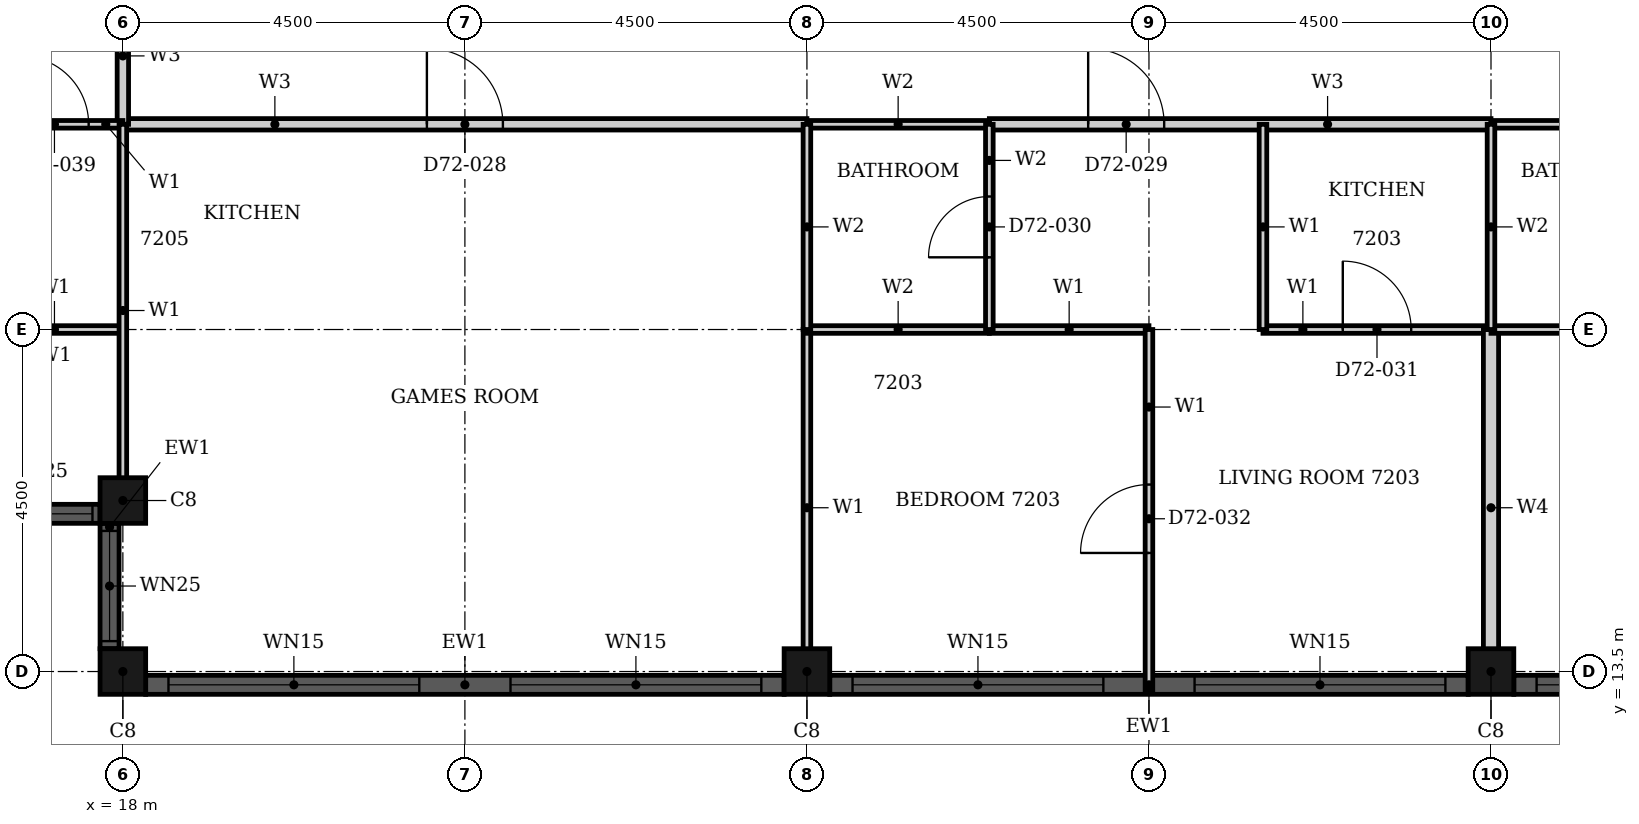
"""IFC4 building model, lengths in metres.
Left out: names, types, materials, properties, quantities, classifications, styles, units other than length and angle.
Written with IfcOpenShell. Run it as: python <this file> out.ifc"""

import sys

from ifc_helpers import new_model, si_unit, direction, frame, frame_2d, origin, origin_2d, place, context, subcontext, project, spatial, rectangle, hollow_rectangle, extrude, element, fill, save


model = new_model("IFC4")
c1 = context("Model", 3, precision=1e-05, world=origin(), true_north=direction((0.0, 1.0)))
c2 = subcontext(c1, "Body", "Model", "MODEL_VIEW")
j1 = project(units=[si_unit("LENGTHUNIT", "METRE"), si_unit("PLANEANGLEUNIT", "RADIAN")], contexts=[c1])
p1 = place(None, origin())
s1 = spatial("IfcSite", under=j1, at=p1, CompositionType="ELEMENT")
p2 = place(p1, origin())
s2 = spatial("IfcBuilding", under=s1, at=p2, CompositionType="ELEMENT")
p3 = place(p2, frame((0.0, 0.0, 283.4)))
s3 = spatial("IfcBuildingStorey", under=s2, at=p3, CompositionType="ELEMENT", Elevation=283.4)
for number, where, z_axis, x_axis in (
    (1, (18.0, 15.75, 0.0), (0.0, 0.0, 1.0), (1.0, 0.0, 0.0)),
    (2, (18.0, 13.5, 0.0), (0.0, 0.0, 1.0), (1.0, 0.0, 0.0)),
    (3, (27.0, 13.5, 0.0), (0.0, 0.0, 1.0), (1.0, 0.0, 0.0)),
    (4, (36.0, 13.5, 0.0), (0.0, 0.0, 1.0), (1.0, 0.0, 0.0)),
):
    element("IfcColumn", number, at=place(p3, frame(where, z_axis=z_axis, x_axis=x_axis)), inside=s3, PredefinedType="COLUMN", context=c2, shape_type="SweptSolid", body=[
        extrude(hollow_rectangle(XDim=0.6, YDim=0.6, WallThickness=0.02, at=origin_2d()), origin(), (0.0, 0.0, 1.0), 3.7),
    ])
p4 = place(p3, frame((16.05, 15.575, 0.0), z_axis=(0.0, 0.0, 1.0), x_axis=(1.0, 0.0, 0.0)))
e5 = element("IfcWall", 5, at=p4, inside=s3, PredefinedType="SOLIDWALL", context=c2, shape_type="SweptSolid", body=[
    extrude(rectangle(XDim=1.65, YDim=0.25, at=frame_2d((0.825, 0.0))), origin(), (0.0, 0.0, 1.0), 3.7),
])
p5 = place(p4, frame((0.1, 0.0, 0.9)))
e6 = element("IfcOpeningElement", 6, at=p5, cuts=e5, PredefinedType="OPENING", context=c2, shape_type="SweptSolid", body=[
    extrude(rectangle(XDim=1.45, YDim=1.85, at=frame_2d((0.725, 0.925))), frame((0.0, 0.135, 0.0), z_axis=(0.0, -1.0, 0.0), x_axis=(1.0, 0.0, 0.0)), (0.0, 0.0, 1.0), 0.27),
])
p6 = place(p3, frame((17.825, 15.45, 0.0), z_axis=(0.0, 0.0, 1.0), x_axis=(0.0, -1.0, 0.0)))
e7 = element("IfcWall", 7, at=p6, inside=s3, PredefinedType="SOLIDWALL", context=c2, shape_type="SweptSolid", body=[
    extrude(rectangle(XDim=1.65, YDim=0.25, at=frame_2d((0.825, 0.0))), origin(), (0.0, 0.0, 1.0), 3.7),
])
p7 = place(p6, frame((0.1, 0.0, 0.9)))
e8 = element("IfcOpeningElement", 8, at=p7, cuts=e7, PredefinedType="OPENING", context=c2, shape_type="SweptSolid", body=[
    extrude(rectangle(XDim=1.45, YDim=1.85, at=frame_2d((0.725, 0.925))), frame((0.0, 0.135, 0.0), z_axis=(0.0, -1.0, 0.0), x_axis=(1.0, 0.0, 0.0)), (0.0, 0.0, 1.0), 0.27),
])
p8 = place(p3, frame((18.3, 13.325, 0.0), z_axis=(0.0, 0.0, 1.0), x_axis=(1.0, 0.0, 0.0)))
e9 = element("IfcWall", 9, at=p8, inside=s3, PredefinedType="SOLIDWALL", context=c2, shape_type="SweptSolid", body=[
    extrude(rectangle(XDim=8.4, YDim=0.25, at=frame_2d((4.2, 0.0))), origin(), (0.0, 0.0, 1.0), 3.7),
])
p9 = place(p8, frame((0.3, 0.0, 0.45)))
e10 = element("IfcOpeningElement", 10, at=p9, cuts=e9, PredefinedType="OPENING", context=c2, shape_type="SweptSolid", body=[
    extrude(rectangle(XDim=3.3, YDim=2.3, at=frame_2d((1.65, 1.15))), frame((0.0, 0.135, 0.0), z_axis=(0.0, -1.0, 0.0), x_axis=(1.0, 0.0, 0.0)), (0.0, 0.0, 1.0), 0.27),
])
p10 = place(p8, frame((4.8, 0.0, 0.45)))
e11 = element("IfcOpeningElement", 11, at=p10, cuts=e9, PredefinedType="OPENING", context=c2, shape_type="SweptSolid", body=[
    extrude(rectangle(XDim=3.3, YDim=2.3, at=frame_2d((1.65, 1.15))), frame((0.0, 0.135, 0.0), z_axis=(0.0, -1.0, 0.0), x_axis=(1.0, 0.0, 0.0)), (0.0, 0.0, 1.0), 0.27),
])
p11 = place(p3, frame((27.3, 13.325, 0.0), z_axis=(0.0, 0.0, 1.0), x_axis=(1.0, 0.0, 0.0)))
e12 = element("IfcWall", 12, at=p11, inside=s3, PredefinedType="SOLIDWALL", context=c2, shape_type="SweptSolid", body=[
    extrude(rectangle(XDim=8.4, YDim=0.25, at=frame_2d((4.2, 0.0))), origin(), (0.0, 0.0, 1.0), 3.7),
])
p12 = place(p11, frame((0.3, 0.0, 0.45)))
e13 = element("IfcOpeningElement", 13, at=p12, cuts=e12, PredefinedType="OPENING", context=c2, shape_type="SweptSolid", body=[
    extrude(rectangle(XDim=3.3, YDim=2.3, at=frame_2d((1.65, 1.15))), frame((0.0, 0.135, 0.0), z_axis=(0.0, -1.0, 0.0), x_axis=(1.0, 0.0, 0.0)), (0.0, 0.0, 1.0), 0.27),
])
p13 = place(p11, frame((4.8, 0.0, 0.45)))
e14 = element("IfcOpeningElement", 14, at=p13, cuts=e12, PredefinedType="OPENING", context=c2, shape_type="SweptSolid", body=[
    extrude(rectangle(XDim=3.3, YDim=2.3, at=frame_2d((1.65, 1.15))), frame((0.0, 0.135, 0.0), z_axis=(0.0, -1.0, 0.0), x_axis=(1.0, 0.0, 0.0)), (0.0, 0.0, 1.0), 0.27),
])
p14 = place(p3, frame((36.3, 13.325, 0.0), z_axis=(0.0, 0.0, 1.0), x_axis=(1.0, 0.0, 0.0)))
e15 = element("IfcWall", 15, at=p14, inside=s3, PredefinedType="SOLIDWALL", context=c2, shape_type="SweptSolid", body=[
    extrude(rectangle(XDim=8.4, YDim=0.25, at=frame_2d((4.2, 0.0))), origin(), (0.0, 0.0, 1.0), 3.7),
])
p15 = place(p14, frame((0.3, 0.0, 0.45)))
e16 = element("IfcOpeningElement", 16, at=p15, cuts=e15, PredefinedType="OPENING", context=c2, shape_type="SweptSolid", body=[
    extrude(rectangle(XDim=3.3, YDim=2.3, at=frame_2d((1.65, 1.15))), frame((0.0, 0.135, 0.0), z_axis=(0.0, -1.0, 0.0), x_axis=(1.0, 0.0, 0.0)), (0.0, 0.0, 1.0), 0.27),
])
p16 = place(p14, frame((4.8, 0.0, 0.45)))
e17 = element("IfcOpeningElement", 17, at=p16, cuts=e15, PredefinedType="OPENING", context=c2, shape_type="SweptSolid", body=[
    extrude(rectangle(XDim=3.3, YDim=2.3, at=frame_2d((1.65, 1.15))), frame((0.0, 0.135, 0.0), z_axis=(0.0, -1.0, 0.0), x_axis=(1.0, 0.0, 0.0)), (0.0, 0.0, 1.0), 0.27),
])
p17 = place(p3, frame((18.0, 20.7, 0.0), z_axis=(0.0, 0.0, 1.0), x_axis=(1.0, 0.0, 0.0)))
e18 = element("IfcWall", 18, at=p17, inside=s3, PredefinedType="PARTITIONING", context=c2, shape_type="SweptSolid", body=[
    extrude(rectangle(XDim=9.0, YDim=0.15, at=frame_2d((4.5, 0.0))), origin(), (0.0, 0.0, 1.0), 3.4),
])
p18 = place(p17, frame((4.0, 0.0, 0.0)))
e19 = element("IfcOpeningElement", 19, at=p18, cuts=e18, PredefinedType="OPENING", context=c2, shape_type="SweptSolid", body=[
    extrude(rectangle(XDim=1.0, YDim=2.1, at=frame_2d((0.5, 1.05))), frame((0.0, 0.085, 0.0), z_axis=(0.0, -1.0, 0.0), x_axis=(1.0, 0.0, 0.0)), (0.0, 0.0, 1.0), 0.17),
])
p19 = place(p3, frame((29.4, 20.7, 0.0), z_axis=(0.0, 0.0, 1.0), x_axis=(1.0, 0.0, 0.0)))
e20 = element("IfcWall", 20, at=p19, inside=s3, PredefinedType="PARTITIONING", context=c2, shape_type="SweptSolid", body=[
    extrude(rectangle(XDim=6.6, YDim=0.15, at=frame_2d((3.3, 0.0))), origin(), (0.0, 0.0, 1.0), 3.4),
])
p20 = place(p19, frame((1.3, 0.0, 0.0)))
e21 = element("IfcOpeningElement", 21, at=p20, cuts=e20, PredefinedType="OPENING", context=c2, shape_type="SweptSolid", body=[
    extrude(rectangle(XDim=1.0, YDim=2.2, at=frame_2d((0.5, 1.1))), frame((0.0, 0.085, 0.0), z_axis=(0.0, -1.0, 0.0), x_axis=(1.0, 0.0, 0.0)), (0.0, 0.0, 1.0), 0.17),
])
p21 = place(p3, frame((18.0, 20.7, 0.0), z_axis=(0.0, 0.0, 1.0), x_axis=(0.0, 1.0, 0.0)))
e22 = element("IfcWall", 22, at=p21, inside=s3, PredefinedType="PARTITIONING", context=c2, shape_type="SweptSolid", body=[
    extrude(rectangle(XDim=1.8, YDim=0.15, at=frame_2d((0.9, 0.0))), origin(), (0.0, 0.0, 1.0), 3.4),
])
p22 = place(p3, frame((29.4, 18.0, 0.0), z_axis=(0.0, 0.0, 1.0), x_axis=(1.0, 0.0, 0.0)))
e23 = element("IfcWall", 23, at=p22, inside=s3, PredefinedType="PARTITIONING", context=c2, shape_type="SweptSolid", body=[
    extrude(rectangle(XDim=2.1, YDim=0.1, at=frame_2d((1.05, 0.0))), origin(), (0.0, 0.0, 1.0), 3.4),
])
p23 = place(p3, frame((33.0, 18.0, 0.0), z_axis=(0.0, 0.0, 1.0), x_axis=(1.0, 0.0, 0.0)))
e24 = element("IfcWall", 24, at=p23, inside=s3, PredefinedType="PARTITIONING", context=c2, shape_type="SweptSolid", body=[
    extrude(rectangle(XDim=3.0, YDim=0.1, at=frame_2d((1.5, 0.0))), origin(), (0.0, 0.0, 1.0), 3.4),
])
p24 = place(p23, frame((1.05, 0.0, 0.0)))
e25 = element("IfcOpeningElement", 25, at=p24, cuts=e24, PredefinedType="OPENING", context=c2, shape_type="SweptSolid", body=[
    extrude(rectangle(XDim=0.9, YDim=2.1, at=frame_2d((0.45, 1.05))), frame((0.0, 0.06, 0.0), z_axis=(0.0, -1.0, 0.0), x_axis=(1.0, 0.0, 0.0)), (0.0, 0.0, 1.0), 0.12),
])
p25 = place(p3, frame((16.2, 18.0, 0.0), z_axis=(0.0, 0.0, 1.0), x_axis=(1.0, 0.0, 0.0)))
e26 = element("IfcWall", 26, at=p25, inside=s3, PredefinedType="PARTITIONING", context=c2, shape_type="SweptSolid", body=[
    extrude(rectangle(XDim=1.8, YDim=0.1, at=frame_2d((0.9, 0.0))), origin(), (0.0, 0.0, 1.0), 3.4),
])
p26 = place(p3, frame((16.2, 20.7, 0.0), z_axis=(0.0, 0.0, 1.0), x_axis=(1.0, 0.0, 0.0)))
e27 = element("IfcWall", 27, at=p26, inside=s3, PredefinedType="PARTITIONING", context=c2, shape_type="SweptSolid", body=[
    extrude(rectangle(XDim=1.8, YDim=0.1, at=frame_2d((0.9, 0.0))), origin(), (0.0, 0.0, 1.0), 3.4),
])
p27 = place(p26, frame((0.45, 0.0, 0.0)))
e28 = element("IfcOpeningElement", 28, at=p27, cuts=e27, PredefinedType="OPENING", context=c2, shape_type="SweptSolid", body=[
    extrude(rectangle(XDim=0.9, YDim=2.1, at=frame_2d((0.45, 1.05))), frame((0.0, 0.06, 0.0), z_axis=(0.0, -1.0, 0.0), x_axis=(1.0, 0.0, 0.0)), (0.0, 0.0, 1.0), 0.12),
])
p28 = place(p3, frame((18.0, 15.8, 0.0), z_axis=(0.0, 0.0, 1.0), x_axis=(0.0, 1.0, 0.0)))
e29 = element("IfcWall", 29, at=p28, inside=s3, PredefinedType="PARTITIONING", context=c2, shape_type="SweptSolid", body=[
    extrude(rectangle(XDim=4.9, YDim=0.1, at=frame_2d((2.45, 0.0))), origin(), (0.0, 0.0, 1.0), 3.4),
])
p29 = place(p3, frame((27.0, 13.31, 0.0), z_axis=(0.0, 0.0, 1.0), x_axis=(0.0, 1.0, 0.0)))
e30 = element("IfcWall", 30, at=p29, inside=s3, PredefinedType="PARTITIONING", context=c2, shape_type="SweptSolid", body=[
    extrude(rectangle(XDim=4.69, YDim=0.1, at=frame_2d((2.345, 0.0))), origin(), (0.0, 0.0, 1.0), 3.4),
])
p30 = place(p3, frame((31.5, 13.26, 0.0), z_axis=(0.0, 0.0, 1.0), x_axis=(0.0, 1.0, 0.0)))
e31 = element("IfcWall", 31, at=p30, inside=s3, PredefinedType="PARTITIONING", context=c2, shape_type="SweptSolid", body=[
    extrude(rectangle(XDim=4.74, YDim=0.1, at=frame_2d((2.37, 0.0))), origin(), (0.0, 0.0, 1.0), 3.4),
])
p31 = place(p30, frame((1.8, 0.0, 0.0)))
e32 = element("IfcOpeningElement", 32, at=p31, cuts=e31, PredefinedType="OPENING", context=c2, shape_type="SweptSolid", body=[
    extrude(rectangle(XDim=0.9, YDim=2.1, at=frame_2d((0.45, 1.05))), frame((0.0, 0.06, 0.0), z_axis=(0.0, -1.0, 0.0), x_axis=(1.0, 0.0, 0.0)), (0.0, 0.0, 1.0), 0.12),
])
p32 = place(p3, frame((33.0, 18.0, 0.0), z_axis=(0.0, 0.0, 1.0), x_axis=(0.0, 1.0, 0.0)))
e33 = element("IfcWall", 33, at=p32, inside=s3, PredefinedType="PARTITIONING", context=c2, shape_type="SweptSolid", body=[
    extrude(rectangle(XDim=2.7, YDim=0.1, at=frame_2d((1.35, 0.0))), origin(), (0.0, 0.0, 1.0), 3.4),
])
p33 = place(p3, frame((36.0, 13.31, 0.0), z_axis=(0.0, 0.0, 1.0), x_axis=(0.0, 1.0, 0.0)))
e34 = element("IfcWall", 34, at=p33, inside=s3, PredefinedType="PARTITIONING", context=c2, shape_type="SweptSolid", body=[
    extrude(rectangle(XDim=4.69, YDim=0.2, at=frame_2d((2.345, 0.0))), origin(), (0.0, 0.0, 1.0), 3.4),
])
for number, where, z_axis, x_axis in (
    (35, (27.0, 18.0, 0.0), (0.0, 0.0, 1.0), (1.0, 0.0, 0.0)),
    (36, (36.0, 18.0, 0.0), (0.0, 0.0, 1.0), (1.0, 0.0, 0.0)),
    (37, (27.0, 20.7, 0.0), (0.0, 0.0, 1.0), (1.0, 0.0, 0.0)),
    (38, (36.0, 20.7, 0.0), (0.0, 0.0, 1.0), (1.0, 0.0, 0.0)),
):
    element("IfcWall", number, at=place(p3, frame(where, z_axis=z_axis, x_axis=x_axis)), inside=s3, PredefinedType="PARTITIONING", context=c2, shape_type="SweptSolid", body=[
        extrude(rectangle(XDim=2.4, YDim=0.1, at=frame_2d((1.2, 0.0))), origin(), (0.0, 0.0, 1.0), 3.4),
    ])
p34 = place(p3, frame((27.0, 18.0, 0.0), z_axis=(0.0, 0.0, 1.0), x_axis=(0.0, 1.0, 0.0)))
e39 = element("IfcWall", 39, at=p34, inside=s3, PredefinedType="PARTITIONING", context=c2, shape_type="SweptSolid", body=[
    extrude(rectangle(XDim=2.7, YDim=0.1, at=frame_2d((1.35, 0.0))), origin(), (0.0, 0.0, 1.0), 3.4),
])
p35 = place(p3, frame((29.4, 18.0, 0.0), z_axis=(0.0, 0.0, 1.0), x_axis=(0.0, 1.0, 0.0)))
e40 = element("IfcWall", 40, at=p35, inside=s3, PredefinedType="PARTITIONING", context=c2, shape_type="SweptSolid", body=[
    extrude(rectangle(XDim=2.7, YDim=0.1, at=frame_2d((1.35, 0.0))), origin(), (0.0, 0.0, 1.0), 3.4),
])
p36 = place(p35, frame((0.95, 0.0, 0.0)))
e41 = element("IfcOpeningElement", 41, at=p36, cuts=e40, PredefinedType="OPENING", context=c2, shape_type="SweptSolid", body=[
    extrude(rectangle(XDim=0.8, YDim=2.1, at=frame_2d((0.4, 1.05))), frame((0.0, 0.06, 0.0), z_axis=(0.0, -1.0, 0.0), x_axis=(1.0, 0.0, 0.0)), (0.0, 0.0, 1.0), 0.12),
])
p37 = place(p3, frame((36.0, 18.0, 0.0), z_axis=(0.0, 0.0, 1.0), x_axis=(0.0, 1.0, 0.0)))
e42 = element("IfcWall", 42, at=p37, inside=s3, PredefinedType="PARTITIONING", context=c2, shape_type="SweptSolid", body=[
    extrude(rectangle(XDim=2.7, YDim=0.1, at=frame_2d((1.35, 0.0))), origin(), (0.0, 0.0, 1.0), 3.4),
])
p38 = place(p5, origin())
e43 = element("IfcWindow", 43, at=p38, inside=s3, PartitioningType="SINGLE_PANEL", PredefinedType="WINDOW", context=c2, shape_type="SweptSolid", body=[
    extrude(rectangle(XDim=1.45, YDim=1.85, at=frame_2d((0.725, 0.925))), frame((0.0, 0.03, 0.0), z_axis=(0.0, -1.0, 0.0), x_axis=(1.0, 0.0, 0.0)), (0.0, 0.0, 1.0), 0.06),
])
fill(e6, e43)
p39 = place(p7, origin())
e44 = element("IfcWindow", 44, at=p39, inside=s3, PartitioningType="SINGLE_PANEL", PredefinedType="WINDOW", context=c2, shape_type="SweptSolid", body=[
    extrude(rectangle(XDim=1.45, YDim=1.85, at=frame_2d((0.725, 0.925))), frame((0.0, 0.03, 0.0), z_axis=(0.0, -1.0, 0.0), x_axis=(1.0, 0.0, 0.0)), (0.0, 0.0, 1.0), 0.06),
])
fill(e8, e44)
p40 = place(p9, origin())
e45 = element("IfcWindow", 45, at=p40, inside=s3, PartitioningType="SINGLE_PANEL", PredefinedType="WINDOW", context=c2, shape_type="SweptSolid", body=[
    extrude(rectangle(XDim=3.3, YDim=2.3, at=frame_2d((1.65, 1.15))), frame((0.0, 0.03, 0.0), z_axis=(0.0, -1.0, 0.0), x_axis=(1.0, 0.0, 0.0)), (0.0, 0.0, 1.0), 0.06),
])
fill(e10, e45)
p41 = place(p10, origin())
e46 = element("IfcWindow", 46, at=p41, inside=s3, PartitioningType="SINGLE_PANEL", PredefinedType="WINDOW", context=c2, shape_type="SweptSolid", body=[
    extrude(rectangle(XDim=3.3, YDim=2.3, at=frame_2d((1.65, 1.15))), frame((0.0, 0.03, 0.0), z_axis=(0.0, -1.0, 0.0), x_axis=(1.0, 0.0, 0.0)), (0.0, 0.0, 1.0), 0.06),
])
fill(e11, e46)
p42 = place(p12, origin())
e47 = element("IfcWindow", 47, at=p42, inside=s3, PartitioningType="SINGLE_PANEL", PredefinedType="WINDOW", context=c2, shape_type="SweptSolid", body=[
    extrude(rectangle(XDim=3.3, YDim=2.3, at=frame_2d((1.65, 1.15))), frame((0.0, 0.03, 0.0), z_axis=(0.0, -1.0, 0.0), x_axis=(1.0, 0.0, 0.0)), (0.0, 0.0, 1.0), 0.06),
])
fill(e13, e47)
p43 = place(p13, origin())
e48 = element("IfcWindow", 48, at=p43, inside=s3, PartitioningType="SINGLE_PANEL", PredefinedType="WINDOW", context=c2, shape_type="SweptSolid", body=[
    extrude(rectangle(XDim=3.3, YDim=2.3, at=frame_2d((1.65, 1.15))), frame((0.0, 0.03, 0.0), z_axis=(0.0, -1.0, 0.0), x_axis=(1.0, 0.0, 0.0)), (0.0, 0.0, 1.0), 0.06),
])
fill(e14, e48)
p44 = place(p15, origin())
e49 = element("IfcWindow", 49, at=p44, inside=s3, PartitioningType="SINGLE_PANEL", PredefinedType="WINDOW", context=c2, shape_type="SweptSolid", body=[
    extrude(rectangle(XDim=3.3, YDim=2.3, at=frame_2d((1.65, 1.15))), frame((0.0, 0.03, 0.0), z_axis=(0.0, -1.0, 0.0), x_axis=(1.0, 0.0, 0.0)), (0.0, 0.0, 1.0), 0.06),
])
fill(e16, e49)
p45 = place(p18, origin())
e50 = element("IfcDoor", 50, at=p45, inside=s3, OperationType="SINGLE_SWING_RIGHT", PredefinedType="DOOR", context=c2, shape_type="SweptSolid", body=[
    extrude(rectangle(XDim=1.0, YDim=2.1, at=frame_2d((0.5, 1.05))), frame((0.0, 0.025, 0.0), z_axis=(0.0, -1.0, 0.0), x_axis=(1.0, 0.0, 0.0)), (0.0, 0.0, 1.0), 0.05),
])
fill(e19, e50)
p46 = place(p20, origin())
e51 = element("IfcDoor", 51, at=p46, inside=s3, OperationType="SINGLE_SWING_LEFT", PredefinedType="DOOR", context=c2, shape_type="SweptSolid", body=[
    extrude(rectangle(XDim=1.0, YDim=2.2, at=frame_2d((0.5, 1.1))), frame((0.0, 0.025, 0.0), z_axis=(0.0, -1.0, 0.0), x_axis=(1.0, 0.0, 0.0)), (0.0, 0.0, 1.0), 0.05),
])
fill(e21, e51)
p47 = place(p36, origin())
e52 = element("IfcDoor", 52, at=p47, inside=s3, OperationType="SINGLE_SWING_RIGHT", PredefinedType="DOOR", context=c2, shape_type="SweptSolid", body=[
    extrude(rectangle(XDim=0.8, YDim=2.1, at=frame_2d((0.4, 1.05))), frame((0.0, 0.025, 0.0), z_axis=(0.0, -1.0, 0.0), x_axis=(1.0, 0.0, 0.0)), (0.0, 0.0, 1.0), 0.05),
])
fill(e41, e52)
p48 = place(p24, origin())
e53 = element("IfcDoor", 53, at=p48, inside=s3, OperationType="SINGLE_SWING_RIGHT", PredefinedType="DOOR", context=c2, shape_type="SweptSolid", body=[
    extrude(rectangle(XDim=0.9, YDim=2.1, at=frame_2d((0.45, 1.05))), frame((0.0, 0.025, 0.0), z_axis=(0.0, -1.0, 0.0), x_axis=(1.0, 0.0, 0.0)), (0.0, 0.0, 1.0), 0.05),
])
fill(e25, e53)
p49 = place(p31, origin())
e54 = element("IfcDoor", 54, at=p49, inside=s3, OperationType="SINGLE_SWING_RIGHT", PredefinedType="DOOR", context=c2, shape_type="SweptSolid", body=[
    extrude(rectangle(XDim=0.9, YDim=2.1, at=frame_2d((0.45, 1.05))), frame((0.0, 0.025, 0.0), z_axis=(0.0, -1.0, 0.0), x_axis=(1.0, 0.0, 0.0)), (0.0, 0.0, 1.0), 0.05),
])
fill(e32, e54)
p50 = place(p27, origin())
e55 = element("IfcDoor", 55, at=p50, inside=s3, OperationType="SINGLE_SWING_RIGHT", PredefinedType="DOOR", context=c2, shape_type="SweptSolid", body=[
    extrude(rectangle(XDim=0.9, YDim=2.1, at=frame_2d((0.45, 1.05))), frame((0.0, 0.025, 0.0), z_axis=(0.0, -1.0, 0.0), x_axis=(1.0, 0.0, 0.0)), (0.0, 0.0, 1.0), 0.05),
])
fill(e28, e55)
save(model, sys.argv[1])
